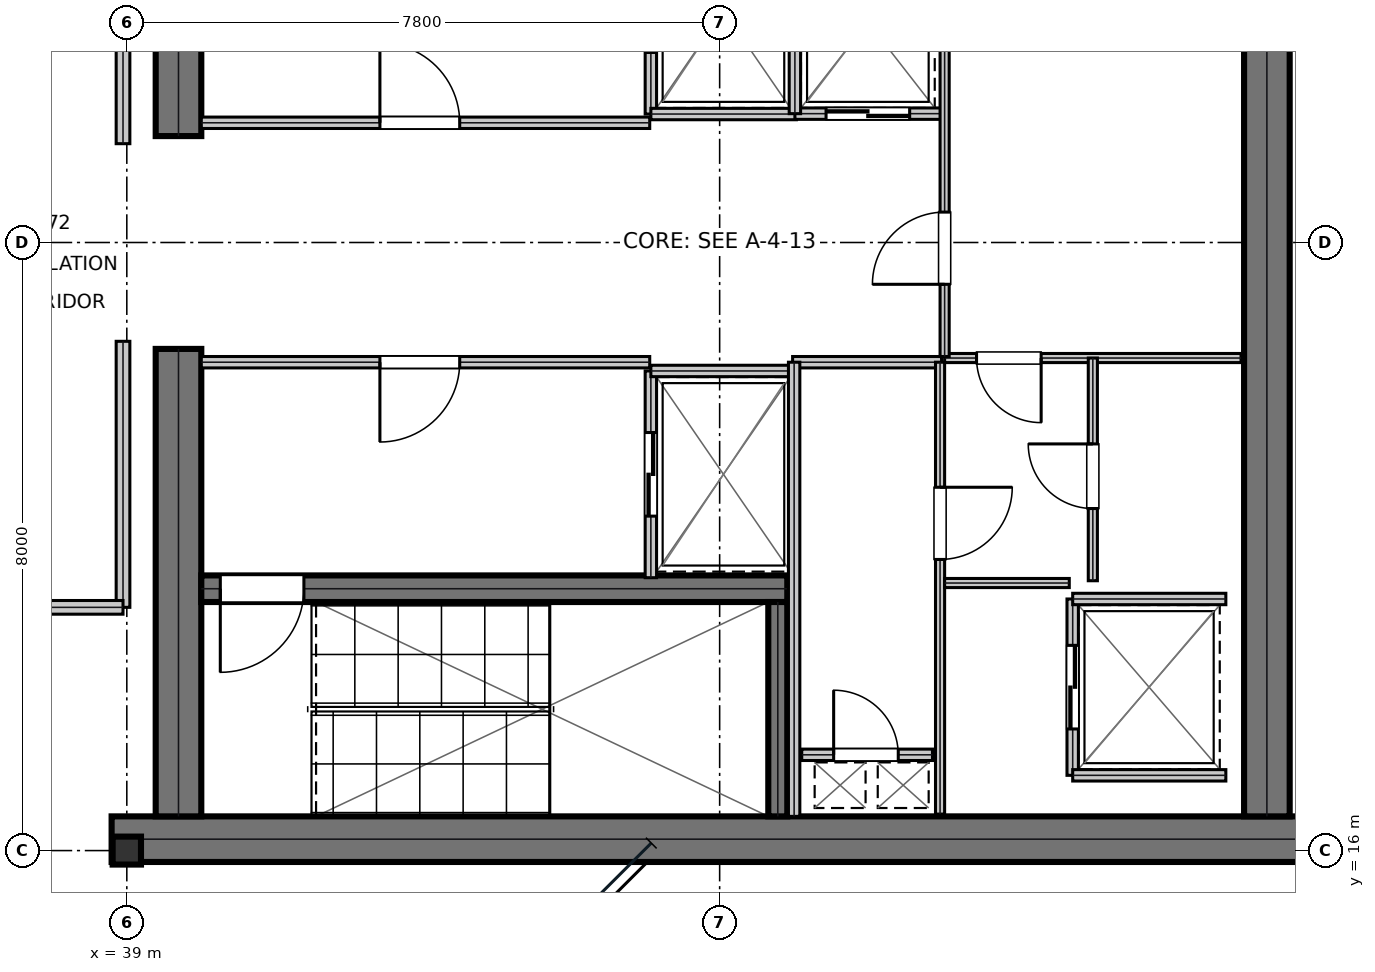
"""IFC4 building model, lengths in metres.
Left out: names, types, materials, properties, quantities, classifications, styles, units other than length and angle.
Written with IfcOpenShell. Run it as: python <this file> out.ifc"""

import sys

from ifc_helpers import new_model, si_unit, direction, frame, frame_2d, origin, origin_2d, place, context, subcontext, project, spatial, rectangle, i_section, extrude, element, fill, save


model = new_model("IFC4")
c1 = context("Model", 3, precision=1e-05, world=origin(), true_north=direction((0.0, 1.0)))
c2 = subcontext(c1, "Body", "Model", "MODEL_VIEW")
j1 = project(units=[si_unit("LENGTHUNIT", "METRE"), si_unit("PLANEANGLEUNIT", "RADIAN")], contexts=[c1])
p1 = place(None, origin())
s1 = spatial("IfcSite", under=j1, at=p1, CompositionType="ELEMENT")
p2 = place(p1, origin())
s2 = spatial("IfcBuilding", under=s1, at=p2, CompositionType="ELEMENT")
p3 = place(p2, frame((0.0, 0.0, 307.35)))
s3 = spatial("IfcBuildingStorey", under=s2, at=p3, CompositionType="ELEMENT", Elevation=307.35)
p4 = place(p3, frame((38.8, 16.15, 0.0), z_axis=(0.0, 0.0, 1.0), x_axis=(1.0, 0.0, 0.0)))
e1 = element("IfcWall", 1, at=p4, inside=s3, PredefinedType="SHEAR", context=c2, shape_type="SweptSolid", body=[
    extrude(rectangle(XDim=16.0, YDim=0.6, at=frame_2d((8.0, 0.0))), origin(), (0.0, 0.0, 1.0), 3.81),
])
for number, where, z_axis, x_axis in (
    (2, (39.68, 16.45, 0.0), (0.0, 0.0, 1.0), (0.0, 1.0, 0.0)),
    (3, (39.68, 25.4, 0.0), (0.0, 0.0, 1.0), (0.0, 1.0, 0.0)),
):
    element("IfcWall", number, at=place(p3, frame(where, z_axis=z_axis, x_axis=x_axis)), inside=s3, PredefinedType="SHEAR", context=c2, shape_type="SweptSolid", body=[
        extrude(rectangle(XDim=6.15, YDim=0.6, at=frame_2d((3.075, 0.0))), origin(), (0.0, 0.0, 1.0), 3.81),
    ])
p5 = place(p3, frame((54.0, 16.45, 0.0), z_axis=(0.0, 0.0, 1.0), x_axis=(0.0, 1.0, 0.0)))
e4 = element("IfcWall", 4, at=p5, inside=s3, PredefinedType="SHEAR", context=c2, shape_type="SweptSolid", body=[
    extrude(rectangle(XDim=15.1, YDim=0.6, at=frame_2d((7.55, 0.0))), origin(), (0.0, 0.0, 1.0), 3.81),
])
p6 = place(p3, frame((39.98, 19.445, 0.0), z_axis=(0.0, 0.0, 1.0), x_axis=(1.0, 0.0, 0.0)))
e5 = element("IfcWall", 5, at=p6, inside=s3, PredefinedType="SHEAR", context=c2, shape_type="SweptSolid", body=[
    extrude(rectangle(XDim=7.71, YDim=0.35, at=frame_2d((3.855, 0.0))), origin(), (0.0, 0.0, 1.0), 3.81),
])
p7 = place(p6, frame((0.25, 0.0, 0.0)))
e6 = element("IfcOpeningElement", 6, at=p7, cuts=e5, PredefinedType="OPENING", context=c2, shape_type="SweptSolid", body=[
    extrude(rectangle(XDim=1.1, YDim=2.15, at=frame_2d((0.55, 1.075))), frame((0.0, 0.185, 0.0), z_axis=(0.0, -1.0, 0.0), x_axis=(1.0, 0.0, 0.0)), (0.0, 0.0, 1.0), 0.37),
])
p8 = place(p3, frame((47.565, 16.45, 0.0), z_axis=(0.0, 0.0, 1.0), x_axis=(0.0, 1.0, 0.0)))
e7 = element("IfcWall", 7, at=p8, inside=s3, PredefinedType="SHEAR", context=c2, shape_type="SweptSolid", body=[
    extrude(rectangle(XDim=2.82, YDim=0.25, at=frame_2d((1.41, 0.0))), origin(), (0.0, 0.0, 1.0), 3.81),
])
p9 = place(p3, frame((39.0, 16.0, 0.0), z_axis=(0.0, 0.0, 1.0), x_axis=(1.0, 0.0, 0.0)))
e8 = element("IfcColumn", 8, at=p9, inside=s3, PredefinedType="COLUMN", context=c2, shape_type="SweptSolid", body=[
    extrude(i_section(OverallWidth=0.373, OverallDepth=0.368, WebThickness=0.015, FlangeThickness=0.024, at=origin_2d()), origin(), (0.0, 0.0, 1.0), 4.044),
])
p10 = place(p3, frame((39.98, 25.575, 0.0), z_axis=(0.0, 0.0, 1.0), x_axis=(1.0, 0.0, 0.0)))
e9 = element("IfcWall", 9, at=p10, inside=s3, PredefinedType="PARTITIONING", context=c2, shape_type="SweptSolid", body=[
    extrude(rectangle(XDim=5.9, YDim=0.15, at=frame_2d((2.95, 0.0))), origin(), (0.0, 0.0, 1.0), 3.81),
])
p11 = place(p10, frame((2.35, 0.0, 0.0)))
e10 = element("IfcOpeningElement", 10, at=p11, cuts=e9, PredefinedType="OPENING", context=c2, shape_type="SweptSolid", body=[
    extrude(rectangle(XDim=1.05, YDim=2.15, at=frame_2d((0.525, 1.075))), frame((0.0, 0.085, 0.0), z_axis=(0.0, -1.0, 0.0), x_axis=(1.0, 0.0, 0.0)), (0.0, 0.0, 1.0), 0.17),
])
p12 = place(p3, frame((39.98, 22.425, 0.0), z_axis=(0.0, 0.0, 1.0), x_axis=(1.0, 0.0, 0.0)))
e11 = element("IfcWall", 11, at=p12, inside=s3, PredefinedType="PARTITIONING", context=c2, shape_type="SweptSolid", body=[
    extrude(rectangle(XDim=5.9, YDim=0.15, at=frame_2d((2.95, 0.0))), origin(), (0.0, 0.0, 1.0), 3.81),
])
p13 = place(p12, frame((2.35, 0.0, 0.0)))
e12 = element("IfcOpeningElement", 12, at=p13, cuts=e11, PredefinedType="OPENING", context=c2, shape_type="SweptSolid", body=[
    extrude(rectangle(XDim=1.05, YDim=2.15, at=frame_2d((0.525, 1.075))), frame((0.0, 0.085, 0.0), z_axis=(0.0, -1.0, 0.0), x_axis=(1.0, 0.0, 0.0)), (0.0, 0.0, 1.0), 0.17),
])
p14 = place(p3, frame((45.895, 25.69, 0.0), z_axis=(0.0, 0.0, 1.0), x_axis=(0.0, 1.0, 0.0)))
e13 = element("IfcWall", 13, at=p14, inside=s3, PredefinedType="PARTITIONING", context=c2, shape_type="SweptSolid", body=[
    extrude(rectangle(XDim=2.72, YDim=0.15, at=frame_2d((1.36, 0.0))), origin(), (0.0, 0.0, 1.0), 3.81),
])
p15 = place(p14, frame((0.81, 0.0, 0.0)))
e14 = element("IfcOpeningElement", 14, at=p15, cuts=e13, PredefinedType="OPENING", context=c2, shape_type="SweptSolid", body=[
    extrude(rectangle(XDim=1.1, YDim=2.15, at=frame_2d((0.55, 1.075))), frame((0.0, 0.085, 0.0), z_axis=(0.0, -1.0, 0.0), x_axis=(1.0, 0.0, 0.0)), (0.0, 0.0, 1.0), 0.17),
])
p16 = place(p3, frame((45.895, 25.69, 0.0), z_axis=(0.0, 0.0, 1.0), x_axis=(1.0, 0.0, 0.0)))
e15 = element("IfcWall", 15, at=p16, inside=s3, PredefinedType="PARTITIONING", context=c2, shape_type="SweptSolid", body=[
    extrude(rectangle(XDim=1.915, YDim=0.15, at=frame_2d((0.958, 0.0))), origin(), (0.0, 0.0, 1.0), 3.81),
])
p17 = place(p3, frame((45.895, 19.59, 0.0), z_axis=(0.0, 0.0, 1.0), x_axis=(0.0, 1.0, 0.0)))
e16 = element("IfcWall", 16, at=p17, inside=s3, PredefinedType="PARTITIONING", context=c2, shape_type="SweptSolid", body=[
    extrude(rectangle(XDim=2.72, YDim=0.15, at=frame_2d((1.36, 0.0))), origin(), (0.0, 0.0, 1.0), 3.81),
])
p18 = place(p17, frame((0.81, 0.0, 0.0)))
e17 = element("IfcOpeningElement", 17, at=p18, cuts=e16, PredefinedType="OPENING", context=c2, shape_type="SweptSolid", body=[
    extrude(rectangle(XDim=1.1, YDim=2.15, at=frame_2d((0.55, 1.075))), frame((0.0, 0.085, 0.0), z_axis=(0.0, -1.0, 0.0), x_axis=(1.0, 0.0, 0.0)), (0.0, 0.0, 1.0), 0.17),
])
p19 = place(p3, frame((45.895, 22.31, 0.0), z_axis=(0.0, 0.0, 1.0), x_axis=(1.0, 0.0, 0.0)))
e18 = element("IfcWall", 18, at=p19, inside=s3, PredefinedType="PARTITIONING", context=c2, shape_type="SweptSolid", body=[
    extrude(rectangle(XDim=1.915, YDim=0.15, at=frame_2d((0.958, 0.0))), origin(), (0.0, 0.0, 1.0), 3.81),
])
p20 = place(p3, frame((47.79, 25.695, 0.0), z_axis=(0.0, 0.0, 1.0), x_axis=(1.0, 0.0, 0.0)))
e19 = element("IfcWall", 19, at=p20, inside=s3, PredefinedType="PARTITIONING", context=c2, shape_type="SweptSolid", body=[
    extrude(rectangle(XDim=1.92, YDim=0.15, at=frame_2d((0.96, 0.0))), origin(), (0.0, 0.0, 1.0), 3.81),
])
p21 = place(p20, frame((0.41, 0.0, 0.0)))
e20 = element("IfcOpeningElement", 20, at=p21, cuts=e19, PredefinedType="OPENING", context=c2, shape_type="SweptSolid", body=[
    extrude(rectangle(XDim=1.1, YDim=2.15, at=frame_2d((0.55, 1.075))), frame((0.0, 0.085, 0.0), z_axis=(0.0, -1.0, 0.0), x_axis=(1.0, 0.0, 0.0)), (0.0, 0.0, 1.0), 0.17),
])
p22 = place(p3, frame((47.79, 25.695, 0.0), z_axis=(0.0, 0.0, 1.0), x_axis=(0.0, 1.0, 0.0)))
e21 = element("IfcWall", 21, at=p22, inside=s3, PredefinedType="PARTITIONING", context=c2, shape_type="SweptSolid", body=[
    extrude(rectangle(XDim=2.415, YDim=0.15, at=frame_2d((1.208, 0.0))), origin(), (0.0, 0.0, 1.0), 3.81),
])
p23 = place(p3, frame((51.445, 16.99, 0.0), z_axis=(0.0, 0.0, 1.0), x_axis=(0.0, 1.0, 0.0)))
e22 = element("IfcWall", 22, at=p23, inside=s3, PredefinedType="PARTITIONING", context=c2, shape_type="SweptSolid", body=[
    extrude(rectangle(XDim=2.32, YDim=0.15, at=frame_2d((1.16, 0.0))), origin(), (0.0, 0.0, 1.0), 3.81),
])
p24 = place(p23, frame((0.61, 0.0, 0.0)))
e23 = element("IfcOpeningElement", 23, at=p24, cuts=e22, PredefinedType="OPENING", context=c2, shape_type="SweptSolid", body=[
    extrude(rectangle(XDim=1.1, YDim=2.15, at=frame_2d((0.55, 1.075))), frame((0.0, 0.085, 0.0), z_axis=(0.0, -1.0, 0.0), x_axis=(1.0, 0.0, 0.0)), (0.0, 0.0, 1.0), 0.17),
])
for number, where, z_axis, x_axis in (
    (24, (51.445, 16.99, 0.0), (0.0, 0.0, 1.0), (1.0, 0.0, 0.0)),
    (25, (51.445, 19.31, 0.0), (0.0, 0.0, 1.0), (1.0, 0.0, 0.0)),
):
    element("IfcWall", number, at=place(p3, frame(where, z_axis=z_axis, x_axis=x_axis)), inside=s3, PredefinedType="PARTITIONING", context=c2, shape_type="SweptSolid", body=[
        extrude(rectangle(XDim=2.015, YDim=0.15, at=frame_2d((1.007, 0.0))), origin(), (0.0, 0.0, 1.0), 3.81),
    ])
p25 = place(p3, frame((47.88, 17.26, 0.0), z_axis=(0.0, 0.0, 1.0), x_axis=(1.0, 0.0, 0.0)))
e26 = element("IfcWall", 26, at=p25, inside=s3, PredefinedType="PARTITIONING", context=c2, shape_type="SweptSolid", body=[
    extrude(rectangle(XDim=1.72, YDim=0.15, at=frame_2d((0.86, 0.0))), origin(), (0.0, 0.0, 1.0), 3.81),
])
p26 = place(p25, frame((0.42, 0.0, 0.0)))
e27 = element("IfcOpeningElement", 27, at=p26, cuts=e26, PredefinedType="OPENING", context=c2, shape_type="SweptSolid", body=[
    extrude(rectangle(XDim=0.85, YDim=2.15, at=frame_2d((0.425, 1.075))), frame((0.0, 0.085, 0.0), z_axis=(0.0, -1.0, 0.0), x_axis=(1.0, 0.0, 0.0)), (0.0, 0.0, 1.0), 0.17),
])
p27 = place(p3, frame((47.76, 22.425, 0.0), z_axis=(0.0, 0.0, 1.0), x_axis=(1.0, 0.0, 0.0)))
e28 = element("IfcWall", 28, at=p27, inside=s3, PredefinedType="PARTITIONING", context=c2, shape_type="SweptSolid", body=[
    extrude(rectangle(XDim=1.96, YDim=0.15, at=frame_2d((0.98, 0.0))), origin(), (0.0, 0.0, 1.0), 3.81),
])
p28 = place(p3, frame((47.78, 16.45, 0.0), z_axis=(0.0, 0.0, 1.0), x_axis=(0.0, 1.0, 0.0)))
e29 = element("IfcWall", 29, at=p28, inside=s3, PredefinedType="PARTITIONING", context=c2, shape_type="SweptSolid", body=[
    extrude(rectangle(XDim=5.975, YDim=0.15, at=frame_2d((2.988, 0.0))), origin(), (0.0, 0.0, 1.0), 3.81),
])
p29 = place(p3, frame((49.7, 16.48, 0.0), z_axis=(0.0, 0.0, 1.0), x_axis=(0.0, 1.0, 0.0)))
e30 = element("IfcWall", 30, at=p29, inside=s3, PredefinedType="PARTITIONING", context=c2, shape_type="SweptSolid", body=[
    extrude(rectangle(XDim=5.945, YDim=0.12, at=frame_2d((2.973, 0.0))), origin(), (0.0, 0.0, 1.0), 3.81),
])
p30 = place(p29, frame((3.35, 0.0, 0.0)))
e31 = element("IfcOpeningElement", 31, at=p30, cuts=e30, PredefinedType="OPENING", context=c2, shape_type="SweptSolid", body=[
    extrude(rectangle(XDim=0.95, YDim=2.15, at=frame_2d((0.475, 1.075))), frame((0.0, 0.07, 0.0), z_axis=(0.0, -1.0, 0.0), x_axis=(1.0, 0.0, 0.0)), (0.0, 0.0, 1.0), 0.14),
])
p31 = place(p3, frame((49.76, 22.48, 0.0), z_axis=(0.0, 0.0, 1.0), x_axis=(1.0, 0.0, 0.0)))
e32 = element("IfcWall", 32, at=p31, inside=s3, PredefinedType="PARTITIONING", context=c2, shape_type="SweptSolid", body=[
    extrude(rectangle(XDim=3.9, YDim=0.12, at=frame_2d((1.95, 0.0))), origin(), (0.0, 0.0, 1.0), 3.81),
])
p32 = place(p31, frame((0.42, 0.0, 0.0)))
e33 = element("IfcOpeningElement", 33, at=p32, cuts=e32, PredefinedType="OPENING", context=c2, shape_type="SweptSolid", body=[
    extrude(rectangle(XDim=0.85, YDim=2.15, at=frame_2d((0.425, 1.075))), frame((0.0, 0.07, 0.0), z_axis=(0.0, -1.0, 0.0), x_axis=(1.0, 0.0, 0.0)), (0.0, 0.0, 1.0), 0.14),
])
p33 = place(p3, frame((51.71, 19.55, 0.0), z_axis=(0.0, 0.0, 1.0), x_axis=(0.0, 1.0, 0.0)))
e34 = element("IfcWall", 34, at=p33, inside=s3, PredefinedType="PARTITIONING", context=c2, shape_type="SweptSolid", body=[
    extrude(rectangle(XDim=2.93, YDim=0.12, at=frame_2d((1.465, 0.0))), origin(), (0.0, 0.0, 1.0), 3.81),
])
p34 = place(p33, frame((0.95, 0.0, 0.0)))
e35 = element("IfcOpeningElement", 35, at=p34, cuts=e34, PredefinedType="OPENING", context=c2, shape_type="SweptSolid", body=[
    extrude(rectangle(XDim=0.85, YDim=2.15, at=frame_2d((0.425, 1.075))), frame((0.0, 0.07, 0.0), z_axis=(0.0, -1.0, 0.0), x_axis=(1.0, 0.0, 0.0)), (0.0, 0.0, 1.0), 0.14),
])
p35 = place(p3, frame((49.76, 19.52, 0.0), z_axis=(0.0, 0.0, 1.0), x_axis=(1.0, 0.0, 0.0)))
e36 = element("IfcWall", 36, at=p35, inside=s3, PredefinedType="PARTITIONING", context=c2, shape_type="SweptSolid", body=[
    extrude(rectangle(XDim=1.64, YDim=0.12, at=frame_2d((0.82, 0.0))), origin(), (0.0, 0.0, 1.0), 3.81),
])
p36 = place(p3, frame((49.76, 22.5, 0.0), z_axis=(0.0, 0.0, 1.0), x_axis=(0.0, 1.0, 0.0)))
e37 = element("IfcWall", 37, at=p36, inside=s3, PredefinedType="PARTITIONING", context=c2, shape_type="SweptSolid", body=[
    extrude(rectangle(XDim=5.72, YDim=0.12, at=frame_2d((2.86, 0.0))), origin(), (0.0, 0.0, 1.0), 3.81),
])
p37 = place(p36, frame((0.95, 0.0, 0.0)))
e38 = element("IfcOpeningElement", 38, at=p37, cuts=e37, PredefinedType="OPENING", context=c2, shape_type="SweptSolid", body=[
    extrude(rectangle(XDim=0.95, YDim=2.15, at=frame_2d((0.475, 1.075))), frame((0.0, 0.07, 0.0), z_axis=(0.0, -1.0, 0.0), x_axis=(1.0, 0.0, 0.0)), (0.0, 0.0, 1.0), 0.14),
])
p38 = place(p3, frame((38.95, 19.2, 0.0), z_axis=(0.0, 0.0, 1.0), x_axis=(0.0, 1.0, 0.0)))
e39 = element("IfcWall", 39, at=p38, inside=s3, PredefinedType="SOLIDWALL", context=c2, shape_type="SweptSolid", body=[
    extrude(rectangle(XDim=3.5, YDim=0.18, at=frame_2d((1.75, 0.0))), origin(), (0.0, 0.0, 1.0), 3.54),
])
p39 = place(p3, frame((37.05, 19.2, 0.0), z_axis=(0.0, 0.0, 1.0), x_axis=(1.0, 0.0, 0.0)))
e40 = element("IfcWall", 40, at=p39, inside=s3, PredefinedType="SOLIDWALL", context=c2, shape_type="SweptSolid", body=[
    extrude(rectangle(XDim=1.9, YDim=0.18, at=frame_2d((0.95, 0.0))), origin(), (0.0, 0.0, 1.0), 3.81),
])
p40 = place(p3, frame((38.95, 25.3, 0.0), z_axis=(0.0, 0.0, 1.0), x_axis=(0.0, 1.0, 0.0)))
e41 = element("IfcWall", 41, at=p40, inside=s3, PredefinedType="SOLIDWALL", context=c2, shape_type="SweptSolid", body=[
    extrude(rectangle(XDim=3.5, YDim=0.18, at=frame_2d((1.75, 0.0))), origin(), (0.0, 0.0, 1.0), 3.54),
])
p41 = place(p11, origin())
e42 = element("IfcDoor", 42, at=p41, inside=s3, OperationType="SINGLE_SWING_LEFT", PredefinedType="DOOR", context=c2, shape_type="SweptSolid", body=[
    extrude(rectangle(XDim=1.05, YDim=2.15, at=frame_2d((0.525, 1.075))), frame((0.0, 0.025, 0.0), z_axis=(0.0, -1.0, 0.0), x_axis=(1.0, 0.0, 0.0)), (0.0, 0.0, 1.0), 0.05),
])
fill(e10, e42)
p42 = place(p13, frame((1.05, 0.0, 0.0), z_axis=(0.0, 0.0, 1.0), x_axis=(-1.0, 0.0, 0.0)))
e43 = element("IfcDoor", 43, at=p42, inside=s3, OperationType="SINGLE_SWING_RIGHT", PredefinedType="DOOR", context=c2, shape_type="SweptSolid", body=[
    extrude(rectangle(XDim=1.05, YDim=2.15, at=frame_2d((0.525, 1.075))), frame((0.0, 0.025, 0.0), z_axis=(0.0, -1.0, 0.0), x_axis=(1.0, 0.0, 0.0)), (0.0, 0.0, 1.0), 0.05),
])
fill(e12, e43)
p43 = place(p18, frame((1.1, 0.0, 0.0), z_axis=(0.0, 0.0, 1.0), x_axis=(-1.0, 0.0, 0.0)))
e44 = element("IfcDoor", 44, at=p43, inside=s3, OperationType="DOUBLE_DOOR_SLIDING", PredefinedType="DOOR", context=c2, shape_type="SweptSolid", body=[
    extrude(rectangle(XDim=1.1, YDim=2.15, at=frame_2d((0.55, 1.075))), frame((0.0, 0.025, 0.0), z_axis=(0.0, -1.0, 0.0), x_axis=(1.0, 0.0, 0.0)), (0.0, 0.0, 1.0), 0.05),
])
fill(e17, e44)
p44 = place(p21, frame((1.1, 0.0, 0.0), z_axis=(0.0, 0.0, 1.0), x_axis=(-1.0, 0.0, 0.0)))
e45 = element("IfcDoor", 45, at=p44, inside=s3, OperationType="DOUBLE_DOOR_SLIDING", PredefinedType="DOOR", context=c2, shape_type="SweptSolid", body=[
    extrude(rectangle(XDim=1.1, YDim=2.15, at=frame_2d((0.55, 1.075))), frame((0.0, 0.025, 0.0), z_axis=(0.0, -1.0, 0.0), x_axis=(1.0, 0.0, 0.0)), (0.0, 0.0, 1.0), 0.05),
])
fill(e20, e45)
p45 = place(p24, frame((1.1, 0.0, 0.0), z_axis=(0.0, 0.0, 1.0), x_axis=(-1.0, 0.0, 0.0)))
e46 = element("IfcDoor", 46, at=p45, inside=s3, OperationType="DOUBLE_DOOR_SLIDING", PredefinedType="DOOR", context=c2, shape_type="SweptSolid", body=[
    extrude(rectangle(XDim=1.1, YDim=2.15, at=frame_2d((0.55, 1.075))), frame((0.0, 0.025, 0.0), z_axis=(0.0, -1.0, 0.0), x_axis=(1.0, 0.0, 0.0)), (0.0, 0.0, 1.0), 0.05),
])
fill(e23, e46)
p46 = place(p26, origin())
e47 = element("IfcDoor", 47, at=p46, inside=s3, OperationType="SINGLE_SWING_LEFT", PredefinedType="TRAPDOOR", context=c2, shape_type="SweptSolid", body=[
    extrude(rectangle(XDim=0.85, YDim=2.15, at=frame_2d((0.425, 1.075))), frame((0.0, 0.025, 0.0), z_axis=(0.0, -1.0, 0.0), x_axis=(1.0, 0.0, 0.0)), (0.0, 0.0, 1.0), 0.05),
])
fill(e27, e47)
p47 = place(p30, frame((0.95, 0.0, 0.0), z_axis=(0.0, 0.0, 1.0), x_axis=(-1.0, 0.0, 0.0)))
e48 = element("IfcDoor", 48, at=p47, inside=s3, OperationType="SINGLE_SWING_LEFT", PredefinedType="DOOR", context=c2, shape_type="SweptSolid", body=[
    extrude(rectangle(XDim=0.95, YDim=2.15, at=frame_2d((0.475, 1.075))), frame((0.0, 0.025, 0.0), z_axis=(0.0, -1.0, 0.0), x_axis=(1.0, 0.0, 0.0)), (0.0, 0.0, 1.0), 0.05),
])
fill(e31, e48)
p48 = place(p32, frame((0.85, 0.0, 0.0), z_axis=(0.0, 0.0, 1.0), x_axis=(-1.0, 0.0, 0.0)))
e49 = element("IfcDoor", 49, at=p48, inside=s3, OperationType="SINGLE_SWING_LEFT", PredefinedType="DOOR", context=c2, shape_type="SweptSolid", body=[
    extrude(rectangle(XDim=0.85, YDim=2.15, at=frame_2d((0.425, 1.075))), frame((0.0, 0.025, 0.0), z_axis=(0.0, -1.0, 0.0), x_axis=(1.0, 0.0, 0.0)), (0.0, 0.0, 1.0), 0.05),
])
fill(e33, e49)
p49 = place(p34, origin())
e50 = element("IfcDoor", 50, at=p49, inside=s3, OperationType="SINGLE_SWING_RIGHT", PredefinedType="DOOR", context=c2, shape_type="SweptSolid", body=[
    extrude(rectangle(XDim=0.85, YDim=2.15, at=frame_2d((0.425, 1.075))), frame((0.0, 0.025, 0.0), z_axis=(0.0, -1.0, 0.0), x_axis=(1.0, 0.0, 0.0)), (0.0, 0.0, 1.0), 0.05),
])
fill(e35, e50)
p50 = place(p37, origin())
e51 = element("IfcDoor", 51, at=p50, inside=s3, OperationType="SINGLE_SWING_LEFT", PredefinedType="DOOR", context=c2, shape_type="SweptSolid", body=[
    extrude(rectangle(XDim=0.95, YDim=2.15, at=frame_2d((0.475, 1.075))), frame((0.0, 0.025, 0.0), z_axis=(0.0, -1.0, 0.0), x_axis=(1.0, 0.0, 0.0)), (0.0, 0.0, 1.0), 0.05),
])
fill(e38, e51)
p51 = place(p7, frame((1.1, 0.0, 0.0), z_axis=(0.0, 0.0, 1.0), x_axis=(-1.0, 0.0, 0.0)))
e52 = element("IfcDoor", 52, at=p51, inside=s3, OperationType="SINGLE_SWING_RIGHT", PredefinedType="DOOR", context=c2, shape_type="SweptSolid", body=[
    extrude(rectangle(XDim=1.1, YDim=2.15, at=frame_2d((0.55, 1.075))), frame((0.0, 0.025, 0.0), z_axis=(0.0, -1.0, 0.0), x_axis=(1.0, 0.0, 0.0)), (0.0, 0.0, 1.0), 0.05),
])
fill(e6, e52)
save(model, sys.argv[1])
